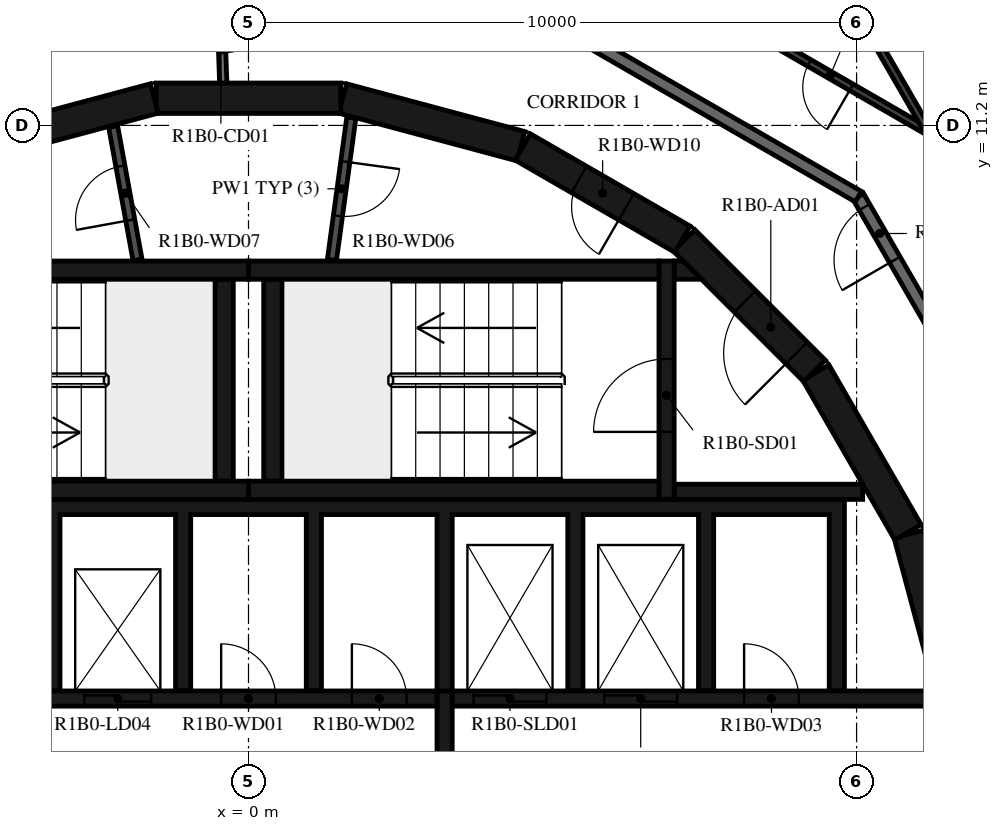
"""IFC4 building model, lengths in metres.
Left out: names, types, materials, properties, quantities, classifications, styles, units other than length and angle.
Written with IfcOpenShell. Run it as: python <this file> out.ifc"""

import sys

from ifc_helpers import new_model, si_unit, direction, frame, frame_2d, origin, place, context, subcontext, project, spatial, polyline, rectangle, outline, extrude, element, fill, save


model = new_model("IFC4")
c1 = context("Model", 3, precision=1e-05, world=origin(), true_north=direction((0.0, 1.0)))
c2 = subcontext(c1, "Body", "Model", "MODEL_VIEW")
j1 = project(units=[si_unit("LENGTHUNIT", "METRE"), si_unit("PLANEANGLEUNIT", "RADIAN")], contexts=[c1])
p1 = place(None, origin())
s1 = spatial("IfcSite", under=j1, at=p1, CompositionType="ELEMENT")
p2 = place(p1, origin())
s2 = spatial("IfcBuilding", under=s1, at=p2, CompositionType="ELEMENT")
p3 = place(p2, frame((0.0, 0.0, 52.4)))
s3 = spatial("IfcBuildingStorey", under=s2, at=p3, CompositionType="ELEMENT", Elevation=52.4)
for number, where, z_axis, x_axis in (
    (1, (11.643, 1.55, 0.0), (0.0, 0.0, 1.0), (-0.259, 0.966, 0.0)),
    (2, (10.845, 4.51, 0.0), (0.0, 0.0, 1.0), (-0.5, 0.866, 0.0)),
):
    element("IfcWall", number, at=place(p3, frame(where, z_axis=z_axis, x_axis=x_axis)), inside=s3, PredefinedType="SHEAR", context=c2, shape_type="SweptSolid", body=[
        extrude(rectangle(XDim=3.033, YDim=0.5, at=frame_2d((1.516, 0.0))), origin(), (0.0, 0.0, 1.0), 3.12),
    ])
p4 = place(p3, frame((9.308, 7.164, 0.0), z_axis=(0.0, 0.0, 1.0), x_axis=(-0.707106781187, 0.707106781187, 0.0)))
e3 = element("IfcWall", 3, at=p4, inside=s3, PredefinedType="SHEAR", context=c2, shape_type="SweptSolid", body=[
    extrude(rectangle(XDim=3.032, YDim=0.5, at=frame_2d((1.516, 0.0))), origin(), (0.0, 0.0, 1.0), 3.12),
])
p5 = place(p4, frame((0.416, 0.0, 0.0)))
e4 = element("IfcOpeningElement", 4, at=p5, cuts=e3, PredefinedType="OPENING", context=c2, shape_type="SweptSolid", body=[
    extrude(rectangle(XDim=1.2, YDim=2.1, at=frame_2d((0.6, 1.05))), frame((0.0, 0.26, 0.0), z_axis=(0.0, -1.0, 0.0), x_axis=(1.0, 0.0, 0.0)), (0.0, 0.0, 1.0), 0.52),
])
p6 = place(p3, frame((7.137, 9.329, 0.0), z_axis=(0.0, 0.0, 1.0), x_axis=(-0.865975092491, 0.500087131594, 0.0)))
e5 = element("IfcWall", 5, at=p6, inside=s3, PredefinedType="SHEAR", context=c2, shape_type="SweptSolid", body=[
    extrude(rectangle(XDim=3.033, YDim=0.5, at=frame_2d((1.516, 0.0))), origin(), (0.0, 0.0, 1.0), 3.12),
])
p7 = place(p6, frame((1.066, 0.0, 0.0)))
e6 = element("IfcOpeningElement", 6, at=p7, cuts=e5, PredefinedType="OPENING", context=c2, shape_type="SweptSolid", body=[
    extrude(rectangle(XDim=0.9, YDim=2.1, at=frame_2d((0.45, 1.05))), frame((0.0, 0.26, 0.0), z_axis=(0.0, -1.0, 0.0), x_axis=(1.0, 0.0, 0.0)), (0.0, 0.0, 1.0), 0.52),
])
for number, where, z_axis, x_axis in (
    (7, (4.479, 10.858, 0.0), (0.0, 0.0, 1.0), (-0.966, 0.259, 0.0)),
    (8, (1.516, 11.647, 0.0), (0.0, 0.0, 1.0), (-1.0, 0.0, 0.0)),
    (9, (-1.55, 11.643, 0.0), (0.0, 0.0, 1.0), (-0.966, -0.259, 0.0)),
):
    element("IfcWall", number, at=place(p3, frame(where, z_axis=z_axis, x_axis=x_axis)), inside=s3, PredefinedType="SHEAR", context=c2, shape_type="SweptSolid", body=[
        extrude(rectangle(XDim=3.033, YDim=0.5, at=frame_2d((1.516, 0.0))), origin(), (0.0, 0.0, 1.0), 3.12),
    ])
for number, where, z_axis, x_axis in (
    (10, (0.0, 5.2, 0.0), (0.0, 0.0, 1.0), (1.0, 0.0, 0.0)),
    (11, (0.0, 8.82, 0.0), (0.0, 0.0, 1.0), (1.0, 0.0, 0.0)),
):
    element("IfcWall", number, at=place(p3, frame(where, z_axis=z_axis, x_axis=x_axis)), inside=s3, PredefinedType="SHEAR", context=c2, shape_type="SweptSolid", body=[
        extrude(rectangle(XDim=6.75, YDim=0.3, at=frame_2d((3.375, 0.0))), origin(), (0.0, 0.0, 1.0), 3.12),
    ])
p8 = place(p3, frame((0.4, 5.35, 0.0), z_axis=(0.0, 0.0, 1.0), x_axis=(0.0, 1.0, 0.0)))
e12 = element("IfcWall", 12, at=p8, inside=s3, PredefinedType="SHEAR", context=c2, shape_type="SweptSolid", body=[
    extrude(rectangle(XDim=3.32, YDim=0.3, at=frame_2d((1.66, 0.0))), origin(), (0.0, 0.0, 1.0), 3.12),
])
p9 = place(p3, frame((6.875, 5.05, 0.0), z_axis=(0.0, 0.0, 1.0), x_axis=(0.0, 1.0, 0.0)))
e13 = element("IfcWall", 13, at=p9, inside=s3, PredefinedType="SHEAR", context=c2, shape_type="SweptSolid", body=[
    extrude(rectangle(XDim=3.92, YDim=0.25, at=frame_2d((1.96, 0.0))), origin(), (0.0, 0.0, 1.0), 3.12),
])
p10 = place(p9, frame((1.11, 0.0, 0.0)))
e14 = element("IfcOpeningElement", 14, at=p10, cuts=e13, PredefinedType="OPENING", context=c2, shape_type="SweptSolid", body=[
    extrude(rectangle(XDim=1.2, YDim=2.1, at=frame_2d((0.6, 1.05))), frame((0.0, 0.135, 0.0), z_axis=(0.0, -1.0, 0.0), x_axis=(1.0, 0.0, 0.0)), (0.0, 0.0, 1.0), 0.27),
])
p11 = place(p3, frame((7.0, 5.175, 0.0), z_axis=(0.0, 0.0, 1.0), x_axis=(1.0, 0.0, 0.0)))
e15 = element("IfcWall", 15, at=p11, inside=s3, PredefinedType="SHEAR", context=c2, shape_type="SweptSolid", body=[
    extrude(rectangle(XDim=3.1, YDim=0.25, at=frame_2d((1.55, 0.0))), origin(), (0.0, 0.0, 1.0), 3.12),
])
p12 = place(p3, origin())
e16 = element("IfcWall", 16, at=p12, inside=s3, PredefinedType="SHEAR", context=c2, shape_type="SweptSolid", body=[
    extrude(outline(polyline([(7.448, 8.67), (7.0, 8.67), (7.0, 8.97), (7.148, 8.97), (7.448, 8.67)])), origin(), (0.0, 0.0, 1.0), 3.12),
])
for number, where, z_axis, x_axis in (
    (17, (-6.75, 5.2, 0.0), (0.0, 0.0, 1.0), (1.0, 0.0, 0.0)),
    (18, (-6.75, 8.82, 0.0), (0.0, 0.0, 1.0), (1.0, 0.0, 0.0)),
):
    element("IfcWall", number, at=place(p3, frame(where, z_axis=z_axis, x_axis=x_axis)), inside=s3, PredefinedType="SHEAR", context=c2, shape_type="SweptSolid", body=[
        extrude(rectangle(XDim=6.75, YDim=0.3, at=frame_2d((3.375, 0.0))), origin(), (0.0, 0.0, 1.0), 3.12),
    ])
p13 = place(p3, frame((-0.4, 5.35, 0.0), z_axis=(0.0, 0.0, 1.0), x_axis=(0.0, 1.0, 0.0)))
e19 = element("IfcWall", 19, at=p13, inside=s3, PredefinedType="SHEAR", context=c2, shape_type="SweptSolid", body=[
    extrude(rectangle(XDim=3.32, YDim=0.3, at=frame_2d((1.66, 0.0))), origin(), (0.0, 0.0, 1.0), 3.12),
])
p14 = place(p3, origin())
e20 = element("IfcWall", 20, at=p14, inside=s3, PredefinedType="SHEAR", context=c2, shape_type="SweptSolid", body=[
    extrude(outline(polyline([(-9.55, 4.8), (-7.65, 4.8), (-7.65, 1.9), (-7.4, 1.9), (-7.4, 4.8), (-5.5, 4.8), (-5.5, 1.9), (-5.25, 1.9), (-5.25, 4.8), (-3.35, 4.8), (-3.35, 1.9), (-3.1, 1.9), (-3.1, 4.8), (-1.2, 4.8), (-1.2, 1.9), (-0.95, 1.9), (-0.95, 4.8), (0.95, 4.8), (0.95, 1.9), (1.2, 1.9), (1.2, 4.8), (3.1, 4.8), (3.1, 1.9), (3.35, 1.9), (3.35, 4.8), (5.25, 4.8), (5.25, 1.9), (5.5, 1.9), (5.5, 4.8), (7.4, 4.8), (7.4, 1.9), (7.65, 1.9), (7.65, 4.8), (9.55, 4.8), (9.55, 1.9), (9.8, 1.9), (9.8, 4.8), (9.8, 5.05), (-9.8, 5.05), (-9.8, 4.8), (-9.8, 1.9), (-9.55, 1.9), (-9.55, 4.8)])), origin(), (0.0, 0.0, 1.0), 3.12),
])
p15 = place(p3, frame((-11.28, 1.775, 0.0), z_axis=(0.0, 0.0, 1.0), x_axis=(1.0, 0.0, 0.0)))
e21 = element("IfcWall", 21, at=p15, inside=s3, PredefinedType="SHEAR", context=c2, shape_type="SweptSolid", body=[
    extrude(rectangle(XDim=14.38, YDim=0.25, at=frame_2d((7.19, 0.0))), origin(), (0.0, 0.0, 1.0), 3.12),
])
p16 = place(p15, frame((2.13, 0.0, 0.0)))
e22 = element("IfcOpeningElement", 22, at=p16, cuts=e21, PredefinedType="OPENING", context=c2, shape_type="SweptSolid", body=[
    extrude(rectangle(XDim=1.1, YDim=2.1, at=frame_2d((0.55, 1.05))), frame((0.0, 0.135, 0.0), z_axis=(0.0, -1.0, 0.0), x_axis=(1.0, 0.0, 0.0)), (0.0, 0.0, 1.0), 0.27),
])
p17 = place(p15, frame((4.28, 0.0, 0.0)))
e23 = element("IfcOpeningElement", 23, at=p17, cuts=e21, PredefinedType="OPENING", context=c2, shape_type="SweptSolid", body=[
    extrude(rectangle(XDim=1.1, YDim=2.1, at=frame_2d((0.55, 1.05))), frame((0.0, 0.135, 0.0), z_axis=(0.0, -1.0, 0.0), x_axis=(1.0, 0.0, 0.0)), (0.0, 0.0, 1.0), 0.27),
])
p18 = place(p15, frame((6.43, 0.0, 0.0)))
e24 = element("IfcOpeningElement", 24, at=p18, cuts=e21, PredefinedType="OPENING", context=c2, shape_type="SweptSolid", body=[
    extrude(rectangle(XDim=1.1, YDim=2.1, at=frame_2d((0.55, 1.05))), frame((0.0, 0.135, 0.0), z_axis=(0.0, -1.0, 0.0), x_axis=(1.0, 0.0, 0.0)), (0.0, 0.0, 1.0), 0.27),
])
p19 = place(p15, frame((8.58, 0.0, 0.0)))
e25 = element("IfcOpeningElement", 25, at=p19, cuts=e21, PredefinedType="OPENING", context=c2, shape_type="SweptSolid", body=[
    extrude(rectangle(XDim=1.1, YDim=2.1, at=frame_2d((0.55, 1.05))), frame((0.0, 0.135, 0.0), z_axis=(0.0, -1.0, 0.0), x_axis=(1.0, 0.0, 0.0)), (0.0, 0.0, 1.0), 0.27),
])
p20 = place(p15, frame((10.83, 0.0, 0.0)))
e26 = element("IfcOpeningElement", 26, at=p20, cuts=e21, PredefinedType="OPENING", context=c2, shape_type="SweptSolid", body=[
    extrude(rectangle(XDim=0.9, YDim=2.1, at=frame_2d((0.45, 1.05))), frame((0.0, 0.135, 0.0), z_axis=(0.0, -1.0, 0.0), x_axis=(1.0, 0.0, 0.0)), (0.0, 0.0, 1.0), 0.27),
])
p21 = place(p15, frame((12.98, 0.0, 0.0)))
e27 = element("IfcOpeningElement", 27, at=p21, cuts=e21, PredefinedType="OPENING", context=c2, shape_type="SweptSolid", body=[
    extrude(rectangle(XDim=0.9, YDim=2.1, at=frame_2d((0.45, 1.05))), frame((0.0, 0.135, 0.0), z_axis=(0.0, -1.0, 0.0), x_axis=(1.0, 0.0, 0.0)), (0.0, 0.0, 1.0), 0.27),
])
p22 = place(p3, frame((3.35, 1.775, 0.0), z_axis=(0.0, 0.0, 1.0), x_axis=(1.0, 0.0, 0.0)))
e28 = element("IfcWall", 28, at=p22, inside=s3, PredefinedType="SHEAR", context=c2, shape_type="SweptSolid", body=[
    extrude(rectangle(XDim=7.93, YDim=0.25, at=frame_2d((3.965, 0.0))), origin(), (0.0, 0.0, 1.0), 3.12),
])
p23 = place(p22, frame((0.35, 0.0, 0.0)))
e29 = element("IfcOpeningElement", 29, at=p23, cuts=e28, PredefinedType="OPENING", context=c2, shape_type="SweptSolid", body=[
    extrude(rectangle(XDim=1.2, YDim=2.4, at=frame_2d((0.6, 1.2))), frame((0.0, 0.135, 0.0), z_axis=(0.0, -1.0, 0.0), x_axis=(1.0, 0.0, 0.0)), (0.0, 0.0, 1.0), 0.27),
])
p24 = place(p22, frame((2.5, 0.0, 0.0)))
e30 = element("IfcOpeningElement", 30, at=p24, cuts=e28, PredefinedType="OPENING", context=c2, shape_type="SweptSolid", body=[
    extrude(rectangle(XDim=1.2, YDim=2.4, at=frame_2d((0.6, 1.2))), frame((0.0, 0.135, 0.0), z_axis=(0.0, -1.0, 0.0), x_axis=(1.0, 0.0, 0.0)), (0.0, 0.0, 1.0), 0.27),
])
p25 = place(p22, frame((4.8, 0.0, 0.0)))
e31 = element("IfcOpeningElement", 31, at=p25, cuts=e28, PredefinedType="OPENING", context=c2, shape_type="SweptSolid", body=[
    extrude(rectangle(XDim=0.9, YDim=2.1, at=frame_2d((0.45, 1.05))), frame((0.0, 0.135, 0.0), z_axis=(0.0, -1.0, 0.0), x_axis=(1.0, 0.0, 0.0)), (0.0, 0.0, 1.0), 0.27),
])
p26 = place(p3, frame((3.225, -1.9, 0.0), z_axis=(0.0, 0.0, 1.0), x_axis=(0.0, 1.0, 0.0)))
e32 = element("IfcWall", 32, at=p26, inside=s3, PredefinedType="SHEAR", context=c2, shape_type="SweptSolid", body=[
    extrude(rectangle(XDim=3.8, YDim=0.25, at=frame_2d((1.9, 0.0))), origin(), (0.0, 0.0, 1.0), 3.12),
])
p27 = place(p3, frame((1.691, 11.326, 0.0), z_axis=(0.0, 0.0, 1.0), x_axis=(-0.135344253201, -0.990798633994, 0.0)))
e33 = element("IfcWall", 33, at=p27, inside=s3, PredefinedType="PARTITIONING", context=c2, shape_type="SweptSolid", body=[
    extrude(rectangle(XDim=2.358, YDim=0.15, at=frame_2d((1.179, 0.0))), origin(), (0.0, 0.0, 1.0), 3.12),
])
p28 = place(p27, frame((0.729, 0.0, 0.0)))
e34 = element("IfcOpeningElement", 34, at=p28, cuts=e33, PredefinedType="OPENING", context=c2, shape_type="SweptSolid", body=[
    extrude(rectangle(XDim=0.9, YDim=2.1, at=frame_2d((0.45, 1.05))), frame((0.0, 0.085, 0.0), z_axis=(0.0, -1.0, 0.0), x_axis=(1.0, 0.0, 0.0)), (0.0, 0.0, 1.0), 0.17),
])
p29 = place(p3, frame((-1.825, 8.99, 0.0), z_axis=(0.0, 0.0, 1.0), x_axis=(-0.179955206115, 0.983674805915, 0.0)))
e35 = element("IfcWall", 35, at=p29, inside=s3, PredefinedType="PARTITIONING", context=c2, shape_type="SweptSolid", body=[
    extrude(rectangle(XDim=2.229, YDim=0.15, at=frame_2d((1.115, 0.0))), origin(), (0.0, 0.0, 1.0), 3.12),
])
p30 = place(p29, frame((0.665, 0.0, 0.0)))
e36 = element("IfcOpeningElement", 36, at=p30, cuts=e35, PredefinedType="OPENING", context=c2, shape_type="SweptSolid", body=[
    extrude(rectangle(XDim=0.9, YDim=2.1, at=frame_2d((0.45, 1.05))), frame((0.0, 0.085, 0.0), z_axis=(0.0, -1.0, 0.0), x_axis=(1.0, 0.0, 0.0)), (0.0, 0.0, 1.0), 0.17),
])
p31 = place(p3, frame((-0.479, 13.7, 0.0), z_axis=(0.0, 0.0, 1.0), x_axis=(0.034919103017, -0.999390142159, 0.0)))
e37 = element("IfcWall", 37, at=p31, inside=s3, PredefinedType="PARTITIONING", context=c2, shape_type="SweptSolid", body=[
    extrude(rectangle(XDim=1.804, YDim=0.12, at=frame_2d((0.902, 0.0))), origin(), (0.0, 0.0, 1.0), 3.12),
])
p32 = place(p31, frame((0.11, 0.0, 0.0)))
e38 = element("IfcOpeningElement", 38, at=p32, cuts=e37, PredefinedType="OPENING", context=c2, shape_type="SweptSolid", body=[
    extrude(rectangle(XDim=1.2, YDim=2.1, at=frame_2d((0.6, 1.05))), frame((0.0, 0.07, 0.0), z_axis=(0.0, -1.0, 0.0), x_axis=(1.0, 0.0, 0.0)), (0.0, 0.0, 1.0), 0.14),
])
p33 = place(p3, frame((13.7, 3.671, 0.0), z_axis=(0.0, 0.0, 1.0), x_axis=(-0.500001669485, 0.866024439905, 0.0)))
e39 = element("IfcWall", 39, at=p33, inside=s3, PredefinedType="STANDARD", context=c2, shape_type="SweptSolid", body=[
    extrude(rectangle(XDim=7.342, YDim=0.2, at=frame_2d((3.671, 0.0))), origin(), (0.0, 0.0, 1.0), 3.12),
])
p34 = place(p33, frame((6.142, 0.0, 0.0)))
e40 = element("IfcOpeningElement", 40, at=p34, cuts=e39, PredefinedType="OPENING", context=c2, shape_type="SweptSolid", body=[
    extrude(rectangle(XDim=1.0, YDim=2.1, at=frame_2d((0.5, 1.05))), frame((0.0, 0.11, 0.0), z_axis=(0.0, -1.0, 0.0), x_axis=(1.0, 0.0, 0.0)), (0.0, 0.0, 1.0), 0.22),
])
p35 = place(p3, frame((10.029, 10.029, 0.0), z_axis=(0.0, 0.0, 1.0), x_axis=(-0.866024439905, 0.500001669485, 0.0)))
e41 = element("IfcWall", 41, at=p35, inside=s3, PredefinedType="STANDARD", context=c2, shape_type="SweptSolid", body=[
    extrude(rectangle(XDim=7.342, YDim=0.2, at=frame_2d((3.671, 0.0))), origin(), (0.0, 0.0, 1.0), 3.12),
])
p36 = place(p3, frame((11.127, 11.127, 0.0), z_axis=(0.0, 0.0, 1.0), x_axis=(-0.86602299963, 0.500004164094, 0.0)))
e42 = element("IfcWall", 42, at=p36, inside=s3, PredefinedType="PARTITIONING", context=c2, shape_type="SweptSolid", body=[
    extrude(rectangle(XDim=7.052, YDim=0.12, at=frame_2d((3.526, 0.0))), origin(), (0.0, 0.0, 1.0), 3.12),
])
p37 = place(p36, frame((1.4, 0.0, 0.0)))
e43 = element("IfcOpeningElement", 43, at=p37, cuts=e42, PredefinedType="OPENING", context=c2, shape_type="SweptSolid", body=[
    extrude(rectangle(XDim=0.8, YDim=2.1, at=frame_2d((0.4, 1.05))), frame((0.0, 0.07, 0.0), z_axis=(0.0, -1.0, 0.0), x_axis=(1.0, 0.0, 0.0)), (0.0, 0.0, 1.0), 0.14),
])
p38 = place(p3, frame((8.7, 15.392, 0.0), z_axis=(0.0, 0.0, 1.0), x_axis=(0.499986106925, -0.866033424806, 0.0)))
e44 = element("IfcWall", 44, at=p38, inside=s3, PredefinedType="PARTITIONING", context=c2, shape_type="SweptSolid", body=[
    extrude(rectangle(XDim=5.317, YDim=0.12, at=frame_2d((2.659, 0.0))), origin(), (0.0, 0.0, 1.0), 3.12),
])
p39 = place(p3, frame((-9.793, 11.897, 0.0), z_axis=(0.0, 0.0, 1.0), x_axis=(0.499981117606, 0.866036305265, 0.0)))
e45 = element("IfcWall", 45, at=p39, inside=s3, PredefinedType="PARTITIONING", context=c2, shape_type="SweptSolid", body=[
    extrude(rectangle(XDim=14.434, YDim=0.12, at=frame_2d((7.217, 0.0))), origin(), (0.0, 0.0, 1.0), 3.12),
])
p40 = place(p39, frame((11.97, 0.0, 0.0)))
e46 = element("IfcOpeningElement", 46, at=p40, cuts=e45, PredefinedType="OPENING", context=c2, shape_type="SweptSolid", body=[
    extrude(rectangle(XDim=0.9, YDim=2.1, at=frame_2d((0.45, 1.05))), frame((0.0, 0.07, 0.0), z_axis=(0.0, -1.0, 0.0), x_axis=(1.0, 0.0, 0.0)), (0.0, 0.0, 1.0), 0.14),
])
p41 = place(p10, origin())
e47 = element("IfcDoor", 47, at=p41, inside=s3, OperationType="SINGLE_SWING_LEFT", PredefinedType="DOOR", context=c2, shape_type="SweptSolid", body=[
    extrude(rectangle(XDim=1.2, YDim=2.1, at=frame_2d((0.6, 1.05))), frame((0.0, 0.025, 0.0), z_axis=(0.0, -1.0, 0.0), x_axis=(1.0, 0.0, 0.0)), (0.0, 0.0, 1.0), 0.05),
])
fill(e14, e47)
p42 = place(p5, origin())
e48 = element("IfcDoor", 48, at=p42, inside=s3, OperationType="SINGLE_SWING_RIGHT", PredefinedType="DOOR", context=c2, shape_type="SweptSolid", body=[
    extrude(rectangle(XDim=1.2, YDim=2.1, at=frame_2d((0.6, 1.05))), frame((0.0, 0.025, 0.0), z_axis=(0.0, -1.0, 0.0), x_axis=(1.0, 0.0, 0.0)), (0.0, 0.0, 1.0), 0.05),
])
fill(e4, e48)
p43 = place(p19, origin())
e49 = element("IfcDoor", 49, at=p43, inside=s3, OperationType="DOUBLE_DOOR_SLIDING", PredefinedType="DOOR", context=c2, shape_type="SweptSolid", body=[
    extrude(rectangle(XDim=1.1, YDim=2.1, at=frame_2d((0.55, 1.05))), frame((0.0, 0.025, 0.0), z_axis=(0.0, -1.0, 0.0), x_axis=(1.0, 0.0, 0.0)), (0.0, 0.0, 1.0), 0.05),
])
fill(e25, e49)
p44 = place(p23, origin())
e50 = element("IfcDoor", 50, at=p44, inside=s3, OperationType="DOUBLE_DOOR_SLIDING", PredefinedType="DOOR", context=c2, shape_type="SweptSolid", body=[
    extrude(rectangle(XDim=1.2, YDim=2.4, at=frame_2d((0.6, 1.2))), frame((0.0, 0.025, 0.0), z_axis=(0.0, -1.0, 0.0), x_axis=(1.0, 0.0, 0.0)), (0.0, 0.0, 1.0), 0.05),
])
fill(e29, e50)
p45 = place(p24, origin())
e51 = element("IfcDoor", 51, at=p45, inside=s3, OperationType="DOUBLE_DOOR_SLIDING", PredefinedType="DOOR", context=c2, shape_type="SweptSolid", body=[
    extrude(rectangle(XDim=1.2, YDim=2.4, at=frame_2d((0.6, 1.2))), frame((0.0, 0.025, 0.0), z_axis=(0.0, -1.0, 0.0), x_axis=(1.0, 0.0, 0.0)), (0.0, 0.0, 1.0), 0.05),
])
fill(e30, e51)
p46 = place(p20, origin())
e52 = element("IfcDoor", 52, at=p46, inside=s3, OperationType="SINGLE_SWING_RIGHT", PredefinedType="DOOR", context=c2, shape_type="SweptSolid", body=[
    extrude(rectangle(XDim=0.9, YDim=2.1, at=frame_2d((0.45, 1.05))), frame((0.0, 0.025, 0.0), z_axis=(0.0, -1.0, 0.0), x_axis=(1.0, 0.0, 0.0)), (0.0, 0.0, 1.0), 0.05),
])
fill(e26, e52)
p47 = place(p21, origin())
e53 = element("IfcDoor", 53, at=p47, inside=s3, OperationType="SINGLE_SWING_LEFT", PredefinedType="DOOR", context=c2, shape_type="SweptSolid", body=[
    extrude(rectangle(XDim=0.9, YDim=2.1, at=frame_2d((0.45, 1.05))), frame((0.0, 0.025, 0.0), z_axis=(0.0, -1.0, 0.0), x_axis=(1.0, 0.0, 0.0)), (0.0, 0.0, 1.0), 0.05),
])
fill(e27, e53)
p48 = place(p25, origin())
e54 = element("IfcDoor", 54, at=p48, inside=s3, OperationType="SINGLE_SWING_RIGHT", PredefinedType="DOOR", context=c2, shape_type="SweptSolid", body=[
    extrude(rectangle(XDim=0.9, YDim=2.1, at=frame_2d((0.45, 1.05))), frame((0.0, 0.025, 0.0), z_axis=(0.0, -1.0, 0.0), x_axis=(1.0, 0.0, 0.0)), (0.0, 0.0, 1.0), 0.05),
])
fill(e31, e54)
p49 = place(p28, origin())
e55 = element("IfcDoor", 55, at=p49, inside=s3, OperationType="SINGLE_SWING_LEFT", PredefinedType="DOOR", context=c2, shape_type="SweptSolid", body=[
    extrude(rectangle(XDim=0.9, YDim=2.1, at=frame_2d((0.45, 1.05))), frame((0.0, 0.025, 0.0), z_axis=(0.0, -1.0, 0.0), x_axis=(1.0, 0.0, 0.0)), (0.0, 0.0, 1.0), 0.05),
])
fill(e34, e55)
p50 = place(p30, origin())
e56 = element("IfcDoor", 56, at=p50, inside=s3, OperationType="SINGLE_SWING_RIGHT", PredefinedType="DOOR", context=c2, shape_type="SweptSolid", body=[
    extrude(rectangle(XDim=0.9, YDim=2.1, at=frame_2d((0.45, 1.05))), frame((0.0, 0.025, 0.0), z_axis=(0.0, -1.0, 0.0), x_axis=(1.0, 0.0, 0.0)), (0.0, 0.0, 1.0), 0.05),
])
fill(e36, e56)
p51 = place(p7, origin())
e57 = element("IfcDoor", 57, at=p51, inside=s3, OperationType="SINGLE_SWING_LEFT", PredefinedType="DOOR", context=c2, shape_type="SweptSolid", body=[
    extrude(rectangle(XDim=0.9, YDim=2.1, at=frame_2d((0.45, 1.05))), frame((0.0, 0.025, 0.0), z_axis=(0.0, -1.0, 0.0), x_axis=(1.0, 0.0, 0.0)), (0.0, 0.0, 1.0), 0.05),
])
fill(e6, e57)
p52 = place(p34, origin())
e58 = element("IfcDoor", 58, at=p52, inside=s3, OperationType="SINGLE_SWING_RIGHT", PredefinedType="DOOR", context=c2, shape_type="SweptSolid", body=[
    extrude(rectangle(XDim=1.0, YDim=2.1, at=frame_2d((0.5, 1.05))), frame((0.0, 0.025, 0.0), z_axis=(0.0, -1.0, 0.0), x_axis=(1.0, 0.0, 0.0)), (0.0, 0.0, 1.0), 0.05),
])
fill(e40, e58)
p53 = place(p37, origin())
e59 = element("IfcDoor", 59, at=p53, inside=s3, OperationType="SINGLE_SWING_RIGHT", PredefinedType="DOOR", context=c2, shape_type="SweptSolid", body=[
    extrude(rectangle(XDim=0.8, YDim=2.1, at=frame_2d((0.4, 1.05))), frame((0.0, 0.025, 0.0), z_axis=(0.0, -1.0, 0.0), x_axis=(1.0, 0.0, 0.0)), (0.0, 0.0, 1.0), 0.05),
])
fill(e43, e59)
p54 = place(p32, origin())
e60 = element("IfcDoor", 60, at=p54, inside=s3, OperationType="DOUBLE_DOOR_SINGLE_SWING", PredefinedType="DOOR", context=c2, shape_type="SweptSolid", body=[
    extrude(rectangle(XDim=1.2, YDim=2.1, at=frame_2d((0.6, 1.05))), frame((0.0, 0.025, 0.0), z_axis=(0.0, -1.0, 0.0), x_axis=(1.0, 0.0, 0.0)), (0.0, 0.0, 1.0), 0.05),
])
fill(e38, e60)
save(model, sys.argv[1])
